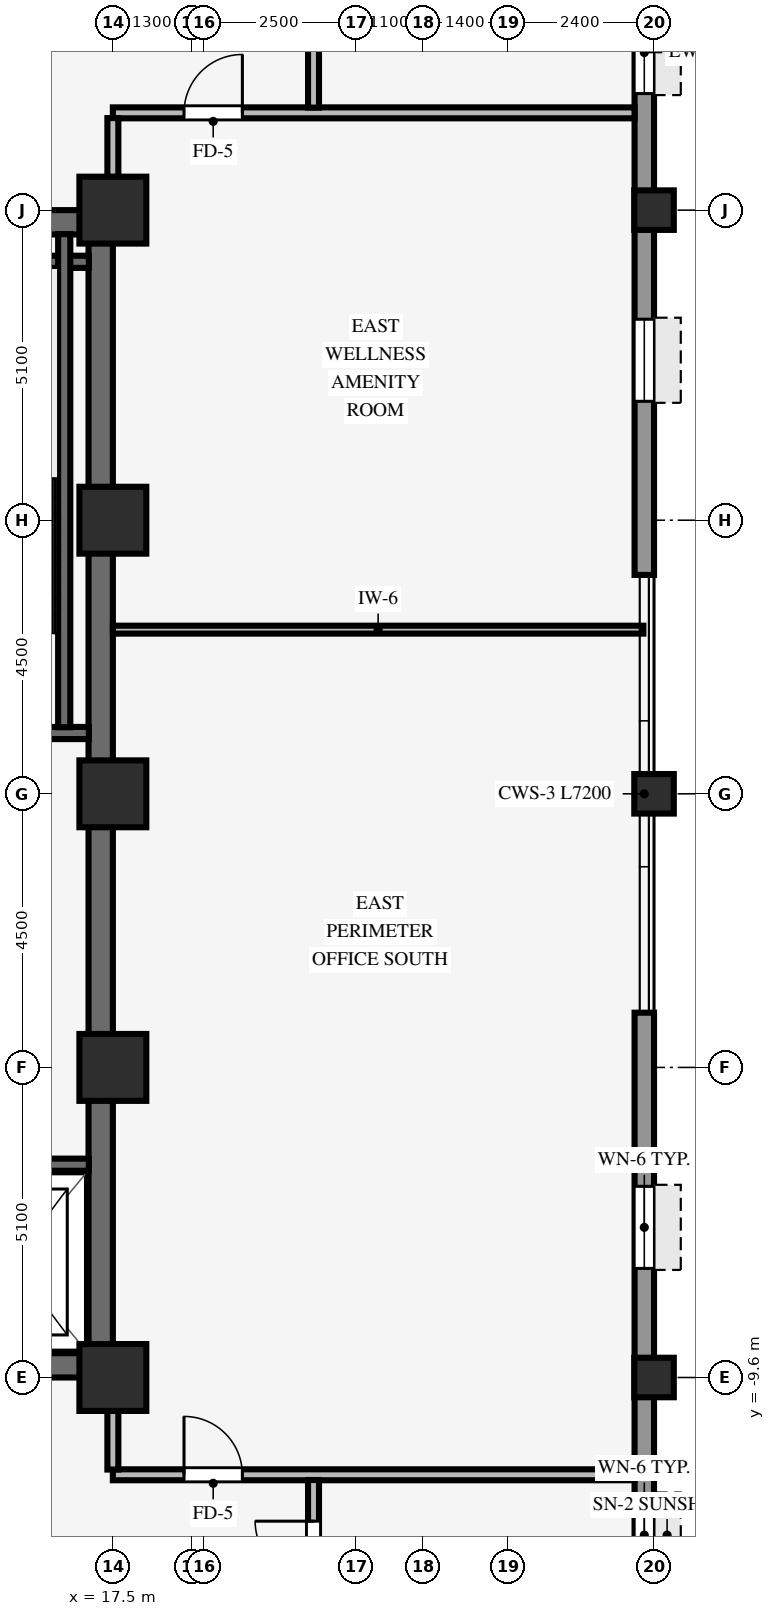
"""IFC4 building model, lengths in metres.
Left out: names, types, materials, properties, quantities, classifications, styles, units other than length and angle.
Written with IfcOpenShell. Run it as: python <this file> out.ifc"""

import sys

from ifc_helpers import new_model, si_unit, direction, frame, frame_2d, origin, origin_2d, place, context, subcontext, project, spatial, rectangle, hollow_rectangle, extrude, source, transform, mapped, element, fill, save


model = new_model("IFC4")
c1 = context("Model", 3, precision=1e-05, world=origin(), true_north=direction((0.0, 1.0)))
c2 = subcontext(c1, "Body", "Model", "MODEL_VIEW")
j1 = project(units=[si_unit("LENGTHUNIT", "METRE"), si_unit("PLANEANGLEUNIT", "RADIAN")], contexts=[c1])
p1 = place(None, origin())
s1 = spatial("IfcSite", under=j1, at=p1, CompositionType="ELEMENT")
p2 = place(p1, origin())
s2 = spatial("IfcBuilding", under=s1, at=p2, CompositionType="ELEMENT")
p3 = place(p2, frame((0.0, 0.0, 116.55)))
s3 = spatial("IfcBuildingStorey", under=s2, at=p3, CompositionType="ELEMENT", Elevation=116.55)
for number, where, z_axis, x_axis in (
    (1, (9.0, -9.4, 0.0), (0.0, 0.0, 1.0), (1.0, 0.0, 0.0)),
    (2, (9.0, 9.4, 0.0), (0.0, 0.0, 1.0), (1.0, 0.0, 0.0)),
):
    element("IfcWall", number, at=place(p3, frame(where, z_axis=z_axis, x_axis=x_axis)), inside=s3, PredefinedType="SHEAR", context=c2, shape_type="SweptSolid", body=[
        extrude(rectangle(XDim=8.5, YDim=0.4, at=frame_2d((4.25, 0.0))), origin(), (0.0, 0.0, 1.0), 3.37),
    ])
p4 = place(p3, frame((17.3, -9.205, 0.0), z_axis=(0.0, 0.0, 1.0), x_axis=(0.0, 1.0, 0.0)))
e3 = element("IfcWall", 3, at=p4, inside=s3, PredefinedType="SHEAR", context=c2, shape_type="SweptSolid", body=[
    extrude(rectangle(XDim=18.41, YDim=0.4, at=frame_2d((9.205, 0.0))), origin(), (0.0, 0.0, 1.0), 3.37),
])
for number, where, z_axis, x_axis in (
    (4, (17.5, -9.6, 0.0), (0.0, 0.0, 1.0), (1.0, 0.0, 0.0)),
    (5, (17.5, -4.5, 0.0), (0.0, 0.0, 1.0), (1.0, 0.0, 0.0)),
    (6, (17.5, 4.5, 0.0), (0.0, 0.0, 1.0), (1.0, 0.0, 0.0)),
    (7, (17.5, 9.6, 0.0), (0.0, 0.0, 1.0), (1.0, 0.0, 0.0)),
    (8, (17.5, 0.0, 0.0), (0.0, 0.0, 1.0), (1.0, 0.0, 0.0)),
):
    element("IfcColumn", number, at=place(p3, frame(where, z_axis=z_axis, x_axis=x_axis)), inside=s3, PredefinedType="COLUMN", context=c2, shape_type="SweptSolid", body=[
        extrude(rectangle(XDim=1.1, YDim=1.1, at=origin_2d()), origin(), (0.0, 0.0, 1.0), 3.37),
    ])
for number, where, z_axis, x_axis in (
    (9, (26.4, -9.6, -0.4), (0.0, 0.0, 1.0), (1.0, 0.0, 0.0)),
    (10, (26.4, 0.0, -0.4), (0.0, 0.0, 1.0), (1.0, 0.0, 0.0)),
    (11, (26.4, 9.6, -0.4), (0.0, 0.0, 1.0), (1.0, 0.0, 0.0)),
):
    element("IfcColumn", number, at=place(p3, frame(where, z_axis=z_axis, x_axis=x_axis)), inside=s3, PredefinedType="COLUMN", context=c2, shape_type="SweptSolid", body=[
        extrude(hollow_rectangle(XDim=0.65, YDim=0.65, WallThickness=0.04, InnerFilletRadius=0.04, OuterFilletRadius=0.08, at=origin_2d()), origin(), (0.0, 0.0, 1.0), 3.77),
    ])
p5 = place(p3, frame((26.24, -20.784, 0.0), z_axis=(0.0, 0.0, 1.0), x_axis=(0.0, 1.0, 0.0)))
e12 = element("IfcWall", 12, at=p5, inside=s3, PredefinedType="STANDARD", context=c2, shape_type="SweptSolid", body=[
    extrude(rectangle(XDim=17.184, YDim=0.32, at=frame_2d((8.592, 0.0))), origin(), (0.0, 0.0, 1.0), 2.705),
])
p6 = place(p5, frame((1.506, 0.0, 0.8)))
e13 = element("IfcOpeningElement", 13, at=p6, cuts=e12, PredefinedType="OPENING", context=c2, shape_type="SweptSolid", body=[
    extrude(rectangle(XDim=1.35, YDim=1.56, at=frame_2d((0.675, 0.78))), frame((0.0, 0.17, 0.0), z_axis=(0.0, -1.0, 0.0), x_axis=(1.0, 0.0, 0.0)), (0.0, 0.0, 1.0), 0.34),
])
p7 = place(p5, frame((7.917, 0.0, 0.8)))
e14 = element("IfcOpeningElement", 14, at=p7, cuts=e12, PredefinedType="OPENING", context=c2, shape_type="SweptSolid", body=[
    extrude(rectangle(XDim=1.35, YDim=1.56, at=frame_2d((0.675, 0.78))), frame((0.0, 0.17, 0.0), z_axis=(0.0, -1.0, 0.0), x_axis=(1.0, 0.0, 0.0)), (0.0, 0.0, 1.0), 0.34),
])
p8 = place(p5, frame((12.978, 0.0, 0.8)))
e15 = element("IfcOpeningElement", 15, at=p8, cuts=e12, PredefinedType="OPENING", context=c2, shape_type="SweptSolid", body=[
    extrude(rectangle(XDim=1.35, YDim=1.56, at=frame_2d((0.675, 0.78))), frame((0.0, 0.17, 0.0), z_axis=(0.0, -1.0, 0.0), x_axis=(1.0, 0.0, 0.0)), (0.0, 0.0, 1.0), 0.34),
])
p9 = place(p3, frame((26.24, 3.6, 0.0), z_axis=(0.0, 0.0, 1.0), x_axis=(0.0, 1.0, 0.0)))
e16 = element("IfcWall", 16, at=p9, inside=s3, PredefinedType="STANDARD", context=c2, shape_type="SweptSolid", body=[
    extrude(rectangle(XDim=17.184, YDim=0.32, at=frame_2d((8.592, 0.0))), origin(), (0.0, 0.0, 1.0), 2.705),
])
p10 = place(p9, frame((2.856, 0.0, 0.8)))
e17 = element("IfcOpeningElement", 17, at=p10, cuts=e16, PredefinedType="OPENING", context=c2, shape_type="SweptSolid", body=[
    extrude(rectangle(XDim=1.35, YDim=1.56, at=frame_2d((0.675, 0.78))), frame((0.0, 0.17, 0.0), z_axis=(0.0, -1.0, 0.0), x_axis=(1.0, 0.0, 0.0)), (0.0, 0.0, 1.0), 0.34),
])
p11 = place(p9, frame((7.917, 0.0, 0.8)))
e18 = element("IfcOpeningElement", 18, at=p11, cuts=e16, PredefinedType="OPENING", context=c2, shape_type="SweptSolid", body=[
    extrude(rectangle(XDim=1.35, YDim=1.56, at=frame_2d((0.675, 0.78))), frame((0.0, 0.17, 0.0), z_axis=(0.0, -1.0, 0.0), x_axis=(1.0, 0.0, 0.0)), (0.0, 0.0, 1.0), 0.34),
])
p12 = place(p9, frame((14.328, 0.0, 0.8)))
e19 = element("IfcOpeningElement", 19, at=p12, cuts=e16, PredefinedType="OPENING", context=c2, shape_type="SweptSolid", body=[
    extrude(rectangle(XDim=1.35, YDim=1.56, at=frame_2d((0.675, 0.78))), frame((0.0, 0.17, 0.0), z_axis=(0.0, -1.0, 0.0), x_axis=(1.0, 0.0, 0.0)), (0.0, 0.0, 1.0), 0.34),
])
for number, where, z_axis, x_axis in (
    (20, (13.535, 1.0, 0.0), (0.0, 0.0, 1.0), (1.0, 0.0, 0.0)),
    (21, (13.535, 8.75, 0.0), (0.0, 0.0, 1.0), (1.0, 0.0, 0.0)),
):
    element("IfcWall", number, at=place(p3, frame(where, z_axis=z_axis, x_axis=x_axis)), inside=s3, PredefinedType="SHEAR", context=c2, shape_type="SweptSolid", body=[
        extrude(rectangle(XDim=3.57, YDim=0.2, at=frame_2d((1.785, 0.0))), origin(), (0.0, 0.0, 1.0), 3.37),
    ])
p13 = place(p3, frame((16.7, 1.095, 0.0), z_axis=(0.0, 0.0, 1.0), x_axis=(0.0, 1.0, 0.0)))
e22 = element("IfcWall", 22, at=p13, inside=s3, PredefinedType="SHEAR", context=c2, shape_type="SweptSolid", body=[
    extrude(rectangle(XDim=8.11, YDim=0.2, at=frame_2d((4.055, 0.0))), origin(), (0.0, 0.0, 1.0), 3.37),
])
p14 = place(p3, frame((14.645, -6.1, 0.0), z_axis=(0.0, 0.0, 1.0), x_axis=(1.0, 0.0, 0.0)))
e23 = element("IfcWall", 23, at=p14, inside=s3, PredefinedType="SHEAR", context=c2, shape_type="SweptSolid", body=[
    extrude(rectangle(XDim=2.46, YDim=0.2, at=frame_2d((1.23, 0.0))), origin(), (0.0, 0.0, 1.0), 3.37),
])
p15 = place(p3, frame((17.5, -11.2, 0.0), z_axis=(0.0, 0.0, 1.0), x_axis=(1.0, 0.0, 0.0)))
e24 = element("IfcWall", 24, at=p15, inside=s3, PredefinedType="PARTITIONING", context=c2, shape_type="SweptSolid", body=[
    extrude(rectangle(XDim=8.58, YDim=0.18, at=frame_2d((4.29, 0.0))), origin(), (0.0, 0.0, 1.0), 3.36),
])
p16 = place(p15, frame((1.17, 0.0, 0.0)))
e25 = element("IfcOpeningElement", 25, at=p16, cuts=e24, PredefinedType="OPENING", context=c2, shape_type="SweptSolid", body=[
    extrude(rectangle(XDim=0.96, YDim=2.1, at=frame_2d((0.48, 1.05))), frame((0.0, 0.1, 0.0), z_axis=(0.0, -1.0, 0.0), x_axis=(1.0, 0.0, 0.0)), (0.0, 0.0, 1.0), 0.2),
])
p17 = place(p3, frame((17.5, 2.7, 0.0), z_axis=(0.0, 0.0, 1.0), x_axis=(1.0, 0.0, 0.0)))
e26 = element("IfcWall", 26, at=p17, inside=s3, PredefinedType="PARTITIONING", context=c2, shape_type="SweptSolid", body=[
    extrude(rectangle(XDim=8.725, YDim=0.13, at=frame_2d((4.363, 0.0))), origin(), (0.0, 0.0, 1.0), 3.36),
])
p18 = place(p3, frame((17.5, 11.2, 0.0), z_axis=(0.0, 0.0, 1.0), x_axis=(1.0, 0.0, 0.0)))
e27 = element("IfcWall", 27, at=p18, inside=s3, PredefinedType="PARTITIONING", context=c2, shape_type="SweptSolid", body=[
    extrude(rectangle(XDim=8.58, YDim=0.18, at=frame_2d((4.29, 0.0))), origin(), (0.0, 0.0, 1.0), 3.36),
])
p19 = place(p18, frame((1.17, 0.0, 0.0)))
e28 = element("IfcOpeningElement", 28, at=p19, cuts=e27, PredefinedType="OPENING", context=c2, shape_type="SweptSolid", body=[
    extrude(rectangle(XDim=0.96, YDim=2.1, at=frame_2d((0.48, 1.05))), frame((0.0, 0.1, 0.0), z_axis=(0.0, -1.0, 0.0), x_axis=(1.0, 0.0, 0.0)), (0.0, 0.0, 1.0), 0.2),
])
for number, where, z_axis, x_axis in (
    (29, (17.5, -11.114, 0.0), (0.0, 0.0, 1.0), (0.0, 1.0, 0.0)),
    (30, (17.5, 10.146, 0.0), (0.0, 0.0, 1.0), (0.0, 1.0, 0.0)),
):
    element("IfcWall", number, at=place(p3, frame(where, z_axis=z_axis, x_axis=x_axis)), inside=s3, PredefinedType="PARTITIONING", context=c2, shape_type="SweptSolid", body=[
        extrude(rectangle(XDim=0.968, YDim=0.18, at=frame_2d((0.484, 0.0))), origin(), (0.0, 0.0, 1.0), 2.738),
    ])
p20 = place(p3, frame((20.8, -22.88, 0.0), z_axis=(0.0, 0.0, 1.0), x_axis=(0.0, 1.0, 0.0)))
e31 = element("IfcWall", 31, at=p20, inside=s3, PredefinedType="PARTITIONING", context=c2, shape_type="SweptSolid", body=[
    extrude(rectangle(XDim=11.594, YDim=0.18, at=frame_2d((5.797, 0.0))), origin(), (0.0, 0.0, 1.0), 3.36),
])
p21 = place(p20, frame((9.957, 0.0, 0.0)))
e32 = element("IfcOpeningElement", 32, at=p21, cuts=e31, PredefinedType="OPENING", context=c2, shape_type="SweptSolid", body=[
    extrude(rectangle(XDim=0.96, YDim=2.1, at=frame_2d((0.48, 1.05))), frame((0.0, 0.1, 0.0), z_axis=(0.0, -1.0, 0.0), x_axis=(1.0, 0.0, 0.0)), (0.0, 0.0, 1.0), 0.2),
])
p22 = place(p3, frame((20.8, 11.286, 0.0), z_axis=(0.0, 0.0, 1.0), x_axis=(0.0, 1.0, 0.0)))
e33 = element("IfcWall", 33, at=p22, inside=s3, PredefinedType="PARTITIONING", context=c2, shape_type="SweptSolid", body=[
    extrude(rectangle(XDim=2.228, YDim=0.18, at=frame_2d((1.114, 0.0))), origin(), (0.0, 0.0, 1.0), 3.36),
])
m1 = source(origin(), c2, "Body", "SweptSolid", [
    extrude(rectangle(XDim=1.35, YDim=1.56, at=frame_2d((0.675, 0.78))), frame((0.0, 0.03, 0.0), z_axis=(0.0, -1.0, 0.0), x_axis=(1.0, 0.0, 0.0)), (0.0, 0.0, 1.0), 0.06),
])
p23 = place(p7, origin())
e34 = element("IfcWindow", 34, at=p23, inside=s3, PartitioningType="SINGLE_PANEL", PredefinedType="WINDOW", context=c2, shape_type="MappedRepresentation", body=[
    mapped(m1, transform((0.0, 0.0, 0.0), scale=1.0)),
])
fill(e14, e34)
p24 = place(p8, origin())
e35 = element("IfcWindow", 35, at=p24, inside=s3, PartitioningType="SINGLE_PANEL", PredefinedType="WINDOW", context=c2, shape_type="MappedRepresentation", body=[
    mapped(m1, transform((0.0, 0.0, 0.0), scale=1.0)),
])
fill(e15, e35)
p25 = place(p10, origin())
e36 = element("IfcWindow", 36, at=p25, inside=s3, PartitioningType="SINGLE_PANEL", PredefinedType="WINDOW", context=c2, shape_type="MappedRepresentation", body=[
    mapped(m1, transform((0.0, 0.0, 0.0), scale=1.0)),
])
fill(e17, e36)
p26 = place(p11, origin())
e37 = element("IfcWindow", 37, at=p26, inside=s3, PartitioningType="SINGLE_PANEL", PredefinedType="WINDOW", context=c2, shape_type="MappedRepresentation", body=[
    mapped(m1, transform((0.0, 0.0, 0.0), scale=1.0)),
])
fill(e18, e37)
m2 = source(origin(), c2, "Body", "SweptSolid", [
    extrude(rectangle(XDim=0.96, YDim=2.1, at=frame_2d((0.48, 1.05))), frame((0.0, 0.025, 0.0), z_axis=(0.0, -1.0, 0.0), x_axis=(1.0, 0.0, 0.0)), (0.0, 0.0, 1.0), 0.05),
])
p27 = place(p16, origin())
e38 = element("IfcDoor", 38, at=p27, inside=s3, OperationType="SINGLE_SWING_LEFT", PredefinedType="DOOR", context=c2, shape_type="MappedRepresentation", body=[
    mapped(m2, transform((0.0, 0.0, 0.0), scale=1.0)),
])
fill(e25, e38)
p28 = place(p19, origin())
e39 = element("IfcDoor", 39, at=p28, inside=s3, OperationType="SINGLE_SWING_RIGHT", PredefinedType="DOOR", context=c2, shape_type="MappedRepresentation", body=[
    mapped(m2, transform((0.0, 0.0, 0.0), scale=1.0)),
])
fill(e28, e39)
p29 = place(p21, origin())
e40 = element("IfcDoor", 40, at=p29, inside=s3, OperationType="SINGLE_SWING_RIGHT", PredefinedType="DOOR", context=c2, shape_type="MappedRepresentation", body=[
    mapped(m2, transform((0.0, 0.0, 0.0), scale=1.0)),
])
fill(e32, e40)
save(model, sys.argv[1])
